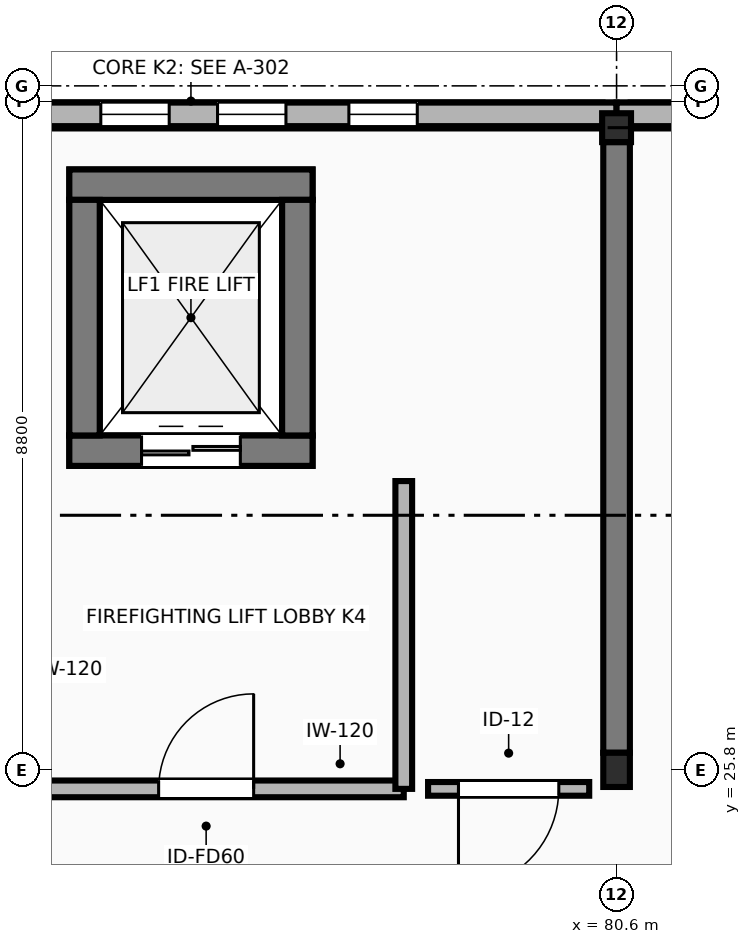
"""IFC4 building model, lengths in metres.
Left out: names, types, materials, properties, quantities, classifications, styles, units other than length and angle.
Written with IfcOpenShell. Run it as: python <this file> out.ifc"""

import sys

from ifc_helpers import new_model, si_unit, direction, frame, frame_2d, origin, origin_2d, place, context, subcontext, project, spatial, polyline, rectangle, outline, extrude, element, fill, save


model = new_model("IFC4")
c1 = context("Model", 3, precision=1e-05, world=origin(), true_north=direction((0.0, 1.0)))
c2 = subcontext(c1, "Body", "Model", "MODEL_VIEW")
j1 = project(units=[si_unit("LENGTHUNIT", "METRE"), si_unit("PLANEANGLEUNIT", "RADIAN")], contexts=[c1])
p1 = place(None, origin())
s1 = spatial("IfcSite", under=j1, at=p1, CompositionType="ELEMENT")
p2 = place(p1, origin())
s2 = spatial("IfcBuilding", under=s1, at=p2, CompositionType="ELEMENT")
p3 = place(p2, frame((0.0, 0.0, 22.2)))
s3 = spatial("IfcBuildingStorey", under=s2, at=p3, CompositionType="ELEMENT", Elevation=22.2)
p4 = place(p3, frame((80.6, 25.8, 0.0), z_axis=(0.0, 0.0, 1.0), x_axis=(1.0, 0.0, 0.0)))
e1 = element("IfcColumn", 1, at=p4, inside=s3, PredefinedType="COLUMN", context=c2, shape_type="SweptSolid", body=[
    extrude(rectangle(XDim=0.35, YDim=0.45, at=origin_2d()), origin(), (0.0, 0.0, 1.0), 4.2),
])
p5 = place(p3, frame((80.6, 34.25, 0.0), z_axis=(0.0, 0.0, 1.0), x_axis=(1.0, 0.0, 0.0)))
e2 = element("IfcColumn", 2, at=p5, inside=s3, PredefinedType="COLUMN", context=c2, shape_type="SweptSolid", body=[
    extrude(rectangle(XDim=0.38, YDim=0.38, at=origin_2d()), origin(), (0.0, 0.0, 1.0), 4.2),
])
p6 = place(p3, frame((90.04, 34.41, 0.0), z_axis=(0.0, 0.0, 1.0), x_axis=(-1.0, 0.0, 0.0)))
e3 = element("IfcWall", 3, at=p6, inside=s3, PredefinedType="STANDARD", context=c2, shape_type="SweptSolid", body=[
    extrude(rectangle(XDim=9.255, YDim=0.34, at=frame_2d((4.627, 0.0))), origin(), (0.0, 0.0, 1.0), 3.92),
])
p7 = place(p3, frame((80.415, 34.41, 0.0), z_axis=(0.0, 0.0, 1.0), x_axis=(-1.0, 0.0, 0.0)))
e4 = element("IfcWall", 4, at=p7, inside=s3, PredefinedType="STANDARD", context=c2, shape_type="SweptSolid", body=[
    extrude(rectangle(XDim=9.205, YDim=0.34, at=frame_2d((4.603, 0.0))), origin(), (0.0, 0.0, 1.0), 3.92),
])
p8 = place(p3, frame((80.6, 34.425, 4.2), z_axis=(0.0, 0.0, 1.0), x_axis=(-1.0, 0.0, 0.0)))
e5 = element("IfcWall", 5, at=p8, inside=s3, PredefinedType="STANDARD", context=c2, shape_type="SweptSolid", body=[
    extrude(outline(polyline([(0.0, 0.0), (9.6, 0.0), (9.6, 0.0), (4.8, 9.09), (0.0, 0.0), (0.0, 0.0)])), frame((0.0, 0.155, 0.0), z_axis=(0.0, -1.0, 0.0), x_axis=(1.0, 0.0, 0.0)), (0.0, 0.0, 1.0), 0.31),
])
p9 = place(p8, frame((2.622, 0.0, 0.75)))
e6 = element("IfcOpeningElement", 6, at=p9, cuts=e5, PredefinedType="OPENING", context=c2, shape_type="SweptSolid", body=[
    extrude(rectangle(XDim=0.9, YDim=0.9, at=frame_2d((0.45, 0.45))), frame((0.0, 0.165, 0.0), z_axis=(0.0, -1.0, 0.0), x_axis=(1.0, 0.0, 0.0)), (0.0, 0.0, 1.0), 0.33),
])
p10 = place(p8, frame((5.886, 0.0, 1.55)))
e7 = element("IfcOpeningElement", 7, at=p10, cuts=e5, PredefinedType="OPENING", context=c2, shape_type="SweptSolid", body=[
    extrude(rectangle(XDim=0.9, YDim=0.9, at=frame_2d((0.45, 0.45))), frame((0.0, 0.165, 0.0), z_axis=(0.0, -1.0, 0.0), x_axis=(1.0, 0.0, 0.0)), (0.0, 0.0, 1.0), 0.33),
])
p11 = place(p8, frame((4.35, 0.0, 3.35)))
e8 = element("IfcOpeningElement", 8, at=p11, cuts=e5, PredefinedType="OPENING", context=c2, shape_type="SweptSolid", body=[
    extrude(rectangle(XDim=0.9, YDim=0.9, at=frame_2d((0.45, 0.45))), frame((0.0, 0.165, 0.0), z_axis=(0.0, -1.0, 0.0), x_axis=(1.0, 0.0, 0.0)), (0.0, 0.0, 1.0), 0.33),
])
p12 = place(p3, frame((90.2, 34.425, 4.2), z_axis=(0.0, 0.0, 1.0), x_axis=(-1.0, 0.0, 0.0)))
e9 = element("IfcWall", 9, at=p12, inside=s3, PredefinedType="STANDARD", context=c2, shape_type="SweptSolid", body=[
    extrude(outline(polyline([(0.0, 0.0), (9.6, 0.0), (9.6, 0.0), (4.8, 7.99), (0.0, 0.0), (0.0, 0.0)])), frame((0.0, 0.155, 0.0), z_axis=(0.0, -1.0, 0.0), x_axis=(1.0, 0.0, 0.0)), (0.0, 0.0, 1.0), 0.31),
])
p13 = place(p12, frame((2.572, 0.0, 0.75)))
e10 = element("IfcOpeningElement", 10, at=p13, cuts=e9, PredefinedType="OPENING", context=c2, shape_type="SweptSolid", body=[
    extrude(rectangle(XDim=1.0, YDim=1.0, at=frame_2d((0.5, 0.5))), frame((0.0, 0.165, 0.0), z_axis=(0.0, -1.0, 0.0), x_axis=(1.0, 0.0, 0.0)), (0.0, 0.0, 1.0), 0.33),
])
p14 = place(p12, frame((5.836, 0.0, 1.55)))
e11 = element("IfcOpeningElement", 11, at=p14, cuts=e9, PredefinedType="OPENING", context=c2, shape_type="SweptSolid", body=[
    extrude(rectangle(XDim=1.0, YDim=1.0, at=frame_2d((0.5, 0.5))), frame((0.0, 0.165, 0.0), z_axis=(0.0, -1.0, 0.0), x_axis=(1.0, 0.0, 0.0)), (0.0, 0.0, 1.0), 0.33),
])
p15 = place(p12, frame((4.3, 0.0, 3.35)))
e12 = element("IfcOpeningElement", 12, at=p15, cuts=e9, PredefinedType="OPENING", context=c2, shape_type="SweptSolid", body=[
    extrude(rectangle(XDim=1.0, YDim=1.0, at=frame_2d((0.5, 0.5))), frame((0.0, 0.165, 0.0), z_axis=(0.0, -1.0, 0.0), x_axis=(1.0, 0.0, 0.0)), (0.0, 0.0, 1.0), 0.33),
])
p16 = place(p3, frame((73.4, 30.0, 0.0), z_axis=(0.0, 0.0, 1.0), x_axis=(1.0, 0.0, 0.0)))
e13 = element("IfcWall", 13, at=p16, inside=s3, PredefinedType="SHEAR", context=c2, shape_type="SweptSolid", body=[
    extrude(rectangle(XDim=3.2, YDim=0.4, at=frame_2d((1.6, 0.0))), origin(), (0.0, 0.0, 1.0), 4.2),
])
p17 = place(p16, frame((0.95, 0.0, 0.0)))
e14 = element("IfcOpeningElement", 14, at=p17, cuts=e13, PredefinedType="OPENING", context=c2, shape_type="SweptSolid", body=[
    extrude(rectangle(XDim=1.3, YDim=2.25, at=frame_2d((0.65, 1.125))), frame((0.0, 0.21, 0.0), z_axis=(0.0, -1.0, 0.0), x_axis=(1.0, 0.0, 0.0)), (0.0, 0.0, 1.0), 0.42),
])
p18 = place(p3, frame((76.6, 33.5, 0.0), z_axis=(0.0, 0.0, 1.0), x_axis=(-1.0, 0.0, 0.0)))
e15 = element("IfcWall", 15, at=p18, inside=s3, PredefinedType="SHEAR", context=c2, shape_type="SweptSolid", body=[
    extrude(rectangle(XDim=3.2, YDim=0.4, at=frame_2d((1.6, 0.0))), origin(), (0.0, 0.0, 1.0), 4.2),
])
for number, where, z_axis, x_axis in (
    (16, (73.6, 30.2, 0.0), (0.0, 0.0, 1.0), (0.0, 1.0, 0.0)),
    (17, (76.4, 33.3, 0.0), (0.0, 0.0, 1.0), (0.0, -1.0, 0.0)),
):
    element("IfcWall", number, at=place(p3, frame(where, z_axis=z_axis, x_axis=x_axis)), inside=s3, PredefinedType="SHEAR", context=c2, shape_type="SweptSolid", body=[
        extrude(rectangle(XDim=3.1, YDim=0.4, at=frame_2d((1.55, 0.0))), origin(), (0.0, 0.0, 1.0), 4.2),
    ])
for number, where, z_axis, x_axis in (
    (18, (73.4, 30.0, 4.2), (0.0, 0.0, 1.0), (1.0, 0.0, 0.0)),
    (19, (76.6, 33.5, 4.2), (0.0, 0.0, 1.0), (-1.0, 0.0, 0.0)),
):
    element("IfcWall", number, at=place(p3, frame(where, z_axis=z_axis, x_axis=x_axis)), inside=s3, PredefinedType="SHEAR", context=c2, shape_type="SweptSolid", body=[
        extrude(rectangle(XDim=3.2, YDim=0.4, at=frame_2d((1.6, 0.0))), origin(), (0.0, 0.0, 1.0), 3.15),
    ])
for number, where, z_axis, x_axis in (
    (20, (73.6, 30.2, 4.2), (0.0, 0.0, 1.0), (0.0, 1.0, 0.0)),
    (21, (76.4, 33.3, 4.2), (0.0, 0.0, 1.0), (0.0, -1.0, 0.0)),
):
    element("IfcWall", number, at=place(p3, frame(where, z_axis=z_axis, x_axis=x_axis)), inside=s3, PredefinedType="SHEAR", context=c2, shape_type="SweptSolid", body=[
        extrude(rectangle(XDim=3.1, YDim=0.4, at=frame_2d((1.55, 0.0))), origin(), (0.0, 0.0, 1.0), 3.15),
    ])
p19 = place(p3, frame((72.6, 25.55, 0.0), z_axis=(0.0, 0.0, 1.0), x_axis=(1.0, 0.0, 0.0)))
e22 = element("IfcWall", 22, at=p19, inside=s3, PredefinedType="PARTITIONING", context=c2, shape_type="SweptSolid", body=[
    extrude(rectangle(XDim=5.2, YDim=0.22, at=frame_2d((2.6, 0.0))), origin(), (0.0, 0.0, 1.0), 3.92),
])
p20 = place(p19, frame((1.975, 0.0, 0.0)))
e23 = element("IfcOpeningElement", 23, at=p20, cuts=e22, PredefinedType="OPENING", context=c2, shape_type="SweptSolid", body=[
    extrude(rectangle(XDim=1.25, YDim=2.2, at=frame_2d((0.625, 1.1))), frame((0.0, 0.12, 0.0), z_axis=(0.0, -1.0, 0.0), x_axis=(1.0, 0.0, 0.0)), (0.0, 0.0, 1.0), 0.24),
])
p21 = place(p3, frame((77.8, 25.55, 0.0), z_axis=(0.0, 0.0, 1.0), x_axis=(0.0, 1.0, 0.0)))
e24 = element("IfcWall", 24, at=p21, inside=s3, PredefinedType="PARTITIONING", context=c2, shape_type="SweptSolid", body=[
    extrude(rectangle(XDim=4.05, YDim=0.22, at=frame_2d((2.025, 0.0))), origin(), (0.0, 0.0, 1.0), 3.92),
])
p22 = place(p3, frame((80.6, 26.025, 0.0), z_axis=(0.0, 0.0, 1.0), x_axis=(0.0, 1.0, 0.0)))
e25 = element("IfcWall", 25, at=p22, inside=s3, PredefinedType="SHEAR", context=c2, shape_type="SweptSolid", body=[
    extrude(rectangle(XDim=8.035, YDim=0.35, at=frame_2d((4.018, 0.0))), origin(), (0.0, 0.0, 1.0), 3.92),
])
p23 = place(p3, frame((80.24, 25.55, 0.0), z_axis=(0.0, 0.0, 1.0), x_axis=(-1.0, 0.0, 0.0)))
e26 = element("IfcWall", 26, at=p23, inside=s3, PredefinedType="PARTITIONING", context=c2, shape_type="SweptSolid", body=[
    extrude(rectangle(XDim=2.12, YDim=0.18, at=frame_2d((1.06, 0.0))), origin(), (0.0, 0.0, 1.0), 3.92),
])
p24 = place(p23, frame((0.4, 0.0, 0.0)))
e27 = element("IfcOpeningElement", 27, at=p24, cuts=e26, PredefinedType="OPENING", context=c2, shape_type="SweptSolid", body=[
    extrude(rectangle(XDim=1.32, YDim=2.22, at=frame_2d((0.66, 1.11))), frame((0.0, 0.1, 0.0), z_axis=(0.0, -1.0, 0.0), x_axis=(1.0, 0.0, 0.0)), (0.0, 0.0, 1.0), 0.2),
])
p25 = place(p9, origin())
e28 = element("IfcWindow", 28, at=p25, inside=s3, PartitioningType="SINGLE_PANEL", PredefinedType="WINDOW", context=c2, shape_type="SweptSolid", body=[
    extrude(rectangle(XDim=0.9, YDim=0.9, at=frame_2d((0.45, 0.45))), frame((0.0, 0.03, 0.0), z_axis=(0.0, -1.0, 0.0), x_axis=(1.0, 0.0, 0.0)), (0.0, 0.0, 1.0), 0.06),
])
fill(e6, e28)
p26 = place(p10, origin())
e29 = element("IfcWindow", 29, at=p26, inside=s3, PartitioningType="SINGLE_PANEL", PredefinedType="WINDOW", context=c2, shape_type="SweptSolid", body=[
    extrude(rectangle(XDim=0.9, YDim=0.9, at=frame_2d((0.45, 0.45))), frame((0.0, 0.03, 0.0), z_axis=(0.0, -1.0, 0.0), x_axis=(1.0, 0.0, 0.0)), (0.0, 0.0, 1.0), 0.06),
])
fill(e7, e29)
p27 = place(p11, origin())
e30 = element("IfcWindow", 30, at=p27, inside=s3, PartitioningType="SINGLE_PANEL", PredefinedType="WINDOW", context=c2, shape_type="SweptSolid", body=[
    extrude(rectangle(XDim=0.9, YDim=0.9, at=frame_2d((0.45, 0.45))), frame((0.0, 0.03, 0.0), z_axis=(0.0, -1.0, 0.0), x_axis=(1.0, 0.0, 0.0)), (0.0, 0.0, 1.0), 0.06),
])
fill(e8, e30)
p28 = place(p17, origin())
e31 = element("IfcDoor", 31, at=p28, inside=s3, OperationType="DOUBLE_DOOR_SLIDING", PredefinedType="DOOR", context=c2, shape_type="SweptSolid", body=[
    extrude(rectangle(XDim=1.3, YDim=2.25, at=frame_2d((0.65, 1.125))), frame((0.0, 0.025, 0.0), z_axis=(0.0, -1.0, 0.0), x_axis=(1.0, 0.0, 0.0)), (0.0, 0.0, 1.0), 0.05),
])
fill(e14, e31)
p29 = place(p20, origin())
e32 = element("IfcDoor", 32, at=p29, inside=s3, OperationType="SINGLE_SWING_RIGHT", PredefinedType="DOOR", context=c2, shape_type="SweptSolid", body=[
    extrude(rectangle(XDim=1.25, YDim=2.2, at=frame_2d((0.625, 1.1))), frame((0.0, 0.025, 0.0), z_axis=(0.0, -1.0, 0.0), x_axis=(1.0, 0.0, 0.0)), (0.0, 0.0, 1.0), 0.05),
])
fill(e23, e32)
p30 = place(p24, origin())
e33 = element("IfcDoor", 33, at=p30, inside=s3, OperationType="SINGLE_SWING_RIGHT", PredefinedType="DOOR", context=c2, shape_type="SweptSolid", body=[
    extrude(rectangle(XDim=1.32, YDim=2.22, at=frame_2d((0.66, 1.11))), frame((0.0, 0.025, 0.0), z_axis=(0.0, -1.0, 0.0), x_axis=(1.0, 0.0, 0.0)), (0.0, 0.0, 1.0), 0.05),
])
fill(e27, e33)
save(model, sys.argv[1])
